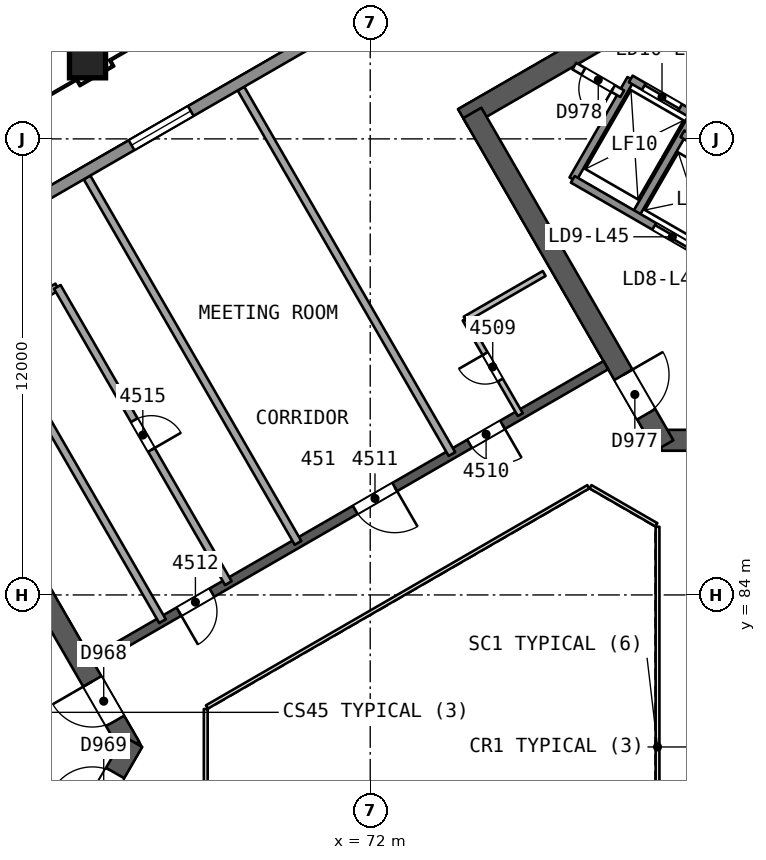
"""IFC4 building model, lengths in metres.
Left out: names, types, materials, properties, quantities, classifications, styles, units other than length and angle.
Written with IfcOpenShell. Run it as: python <this file> out.ifc"""

import sys

from ifc_helpers import new_model, si_unit, direction, frame, frame_2d, origin, origin_2d, place, context, subcontext, project, spatial, rectangle, extrude, element, fill, save


model = new_model("IFC4")
c1 = context("Model", 3, precision=1e-05, world=origin(), true_north=direction((0.0, 1.0)))
c2 = subcontext(c1, "Body", "Model", "MODEL_VIEW")
j1 = project(units=[si_unit("LENGTHUNIT", "METRE"), si_unit("PLANEANGLEUNIT", "RADIAN")], contexts=[c1])
p1 = place(None, origin())
s1 = spatial("IfcSite", under=j1, at=p1, CompositionType="ELEMENT")
p2 = place(p1, origin())
s2 = spatial("IfcBuilding", under=s1, at=p2, CompositionType="ELEMENT")
p3 = place(p2, frame((0.0, 0.0, 185.9)))
s3 = spatial("IfcBuildingStorey", under=s2, at=p3, CompositionType="ELEMENT", Elevation=185.9)
p4 = place(p3, frame((65.682, 80.0, 0.0), z_axis=(0.0, 0.0, 1.0), x_axis=(-0.500000202252, 0.866025287014, 0.0)))
e1 = element("IfcWall", 1, at=p4, inside=s3, PredefinedType="SHEAR", context=c2, shape_type="SweptSolid", body=[
    extrude(rectangle(XDim=10.221, YDim=0.55, at=frame_2d((5.111, 0.0))), origin(), (0.0, 0.0, 1.0), 3.7),
])
p5 = place(p4, frame((0.791, 0.0, 0.0)))
e2 = element("IfcOpeningElement", 2, at=p5, cuts=e1, PredefinedType="OPENING", context=c2, shape_type="SweptSolid", body=[
    extrude(rectangle(XDim=1.2, YDim=2.1, at=frame_2d((0.6, 1.05))), frame((0.0, 0.286, 0.0), z_axis=(0.0, -1.0, 0.0), x_axis=(1.0, 0.0, 0.0)), (0.0, 0.0, 1.0), 0.571),
])
p6 = place(p3, frame((60.709, 71.386, 0.0), z_axis=(0.0, 0.0, 1.0), x_axis=(0.500015938302, 0.866016201606, 0.0)))
e3 = element("IfcWall", 3, at=p6, inside=s3, PredefinedType="SHEAR", context=c2, shape_type="SweptSolid", body=[
    extrude(rectangle(XDim=10.105, YDim=0.55, at=frame_2d((5.053, 0.0))), origin(), (0.0, 0.0, 1.0), 3.7),
])
p7 = place(p6, frame((7.955, 0.0, 0.0)))
e4 = element("IfcOpeningElement", 4, at=p7, cuts=e3, PredefinedType="OPENING", context=c2, shape_type="SweptSolid", body=[
    extrude(rectangle(XDim=1.2, YDim=2.1, at=frame_2d((0.6, 1.05))), frame((0.0, 0.286, 0.0), z_axis=(0.0, -1.0, 0.0), x_axis=(1.0, 0.0, 0.0)), (0.0, 0.0, 1.0), 0.571),
])
p8 = place(p3, frame((79.659, 88.069, 0.0), z_axis=(0.0, 0.0, 1.0), x_axis=(1.0, 0.0, 0.0)))
e5 = element("IfcWall", 5, at=p8, inside=s3, PredefinedType="SHEAR", context=c2, shape_type="SweptSolid", body=[
    extrude(rectangle(XDim=10.221, YDim=0.55, at=frame_2d((5.111, 0.0))), origin(), (0.0, 0.0, 1.0), 3.7),
])
p9 = place(p8, frame((0.791, 0.0, 0.0)))
e6 = element("IfcOpeningElement", 6, at=p9, cuts=e5, PredefinedType="OPENING", context=c2, shape_type="SweptSolid", body=[
    extrude(rectangle(XDim=1.2, YDim=2.1, at=frame_2d((0.6, 1.05))), frame((0.0, 0.286, 0.0), z_axis=(0.0, -1.0, 0.0), x_axis=(1.0, 0.0, 0.0)), (0.0, 0.0, 1.0), 0.571),
])
p10 = place(p3, frame((86.723, 103.633, 0.0), z_axis=(0.0, 0.0, 1.0), x_axis=(-0.866023530946, -0.500003243837, 0.0)))
e7 = element("IfcWall", 7, at=p10, inside=s3, PredefinedType="SHEAR", context=c2, shape_type="SweptSolid", body=[
    extrude(rectangle(XDim=14.175, YDim=0.55, at=frame_2d((7.087, 0.0))), origin(), (0.0, 0.0, 1.0), 3.7),
])
p11 = place(p3, frame((74.686, 96.683, 0.0), z_axis=(0.0, 0.0, 1.0), x_axis=(0.499997818338, -0.866026663364, 0.0)))
e8 = element("IfcWall", 8, at=p11, inside=s3, PredefinedType="SHEAR", context=c2, shape_type="SweptSolid", body=[
    extrude(rectangle(XDim=10.105, YDim=0.55, at=frame_2d((5.052, 0.0))), origin(), (0.0, 0.0, 1.0), 3.7),
])
p12 = place(p11, frame((7.955, 0.0, 0.0)))
e9 = element("IfcOpeningElement", 9, at=p12, cuts=e8, PredefinedType="OPENING", context=c2, shape_type="SweptSolid", body=[
    extrude(rectangle(XDim=1.2, YDim=2.1, at=frame_2d((0.6, 1.05))), frame((0.0, 0.286, 0.0), z_axis=(0.0, -1.0, 0.0), x_axis=(1.0, 0.0, 0.0)), (0.0, 0.0, 1.0), 0.571),
])
p13 = place(p3, frame((78.2, 90.046, 0.0), z_axis=(0.0, 0.0, 1.0), x_axis=(-0.866026492143, -0.499998114903, 0.0)))
e10 = element("IfcWall", 10, at=p13, inside=s3, PredefinedType="SHEAR", context=c2, shape_type="SweptSolid", body=[
    extrude(rectangle(XDim=15.588, YDim=0.25, at=frame_2d((7.794, 0.0))), origin(), (0.0, 0.0, 1.0), 3.25),
])
p14 = place(p13, frame((3.138, 0.0, 0.0)))
e11 = element("IfcOpeningElement", 11, at=p14, cuts=e10, PredefinedType="OPENING", context=c2, shape_type="SweptSolid", body=[
    extrude(rectangle(XDim=1.0, YDim=2.1, at=frame_2d((0.5, 1.05))), frame((0.0, 0.135, 0.0), z_axis=(0.0, -1.0, 0.0), x_axis=(1.0, 0.0, 0.0)), (0.0, 0.0, 1.0), 0.271),
])
p15 = place(p13, frame((6.415, 0.0, 0.0)))
e12 = element("IfcOpeningElement", 12, at=p15, cuts=e10, PredefinedType="OPENING", context=c2, shape_type="SweptSolid", body=[
    extrude(rectangle(XDim=1.2, YDim=2.4, at=frame_2d((0.6, 1.2))), frame((0.0, 0.135, 0.0), z_axis=(0.0, -1.0, 0.0), x_axis=(1.0, 0.0, 0.0)), (0.0, 0.0, 1.0), 0.271),
])
p16 = place(p13, frame((11.971, 0.0, 0.0)))
e13 = element("IfcOpeningElement", 13, at=p16, cuts=e10, PredefinedType="OPENING", context=c2, shape_type="SweptSolid", body=[
    extrude(rectangle(XDim=1.0, YDim=2.1, at=frame_2d((0.5, 1.05))), frame((0.0, 0.135, 0.0), z_axis=(0.0, -1.0, 0.0), x_axis=(1.0, 0.0, 0.0)), (0.0, 0.0, 1.0), 0.271),
])
p17 = place(p3, frame((64.549, 98.102, 0.0), z_axis=(0.010092954999, -0.017481261926, 0.999796248113), x_axis=(-0.499897099477, 0.865849541015, 0.020185694417)))
e14 = element("IfcColumn", 14, at=p17, inside=s3, PredefinedType="COLUMN", context=c2, shape_type="SweptSolid", body=[
    extrude(rectangle(XDim=0.95, YDim=0.95, at=origin_2d()), origin(), (0.0, 0.0, 1.0), 3.701),
])
p18 = place(p3, frame((75.948, 88.746, 0.0), z_axis=(0.0, 0.0, 1.0), x_axis=(-0.499987231761, 0.866032775405, 0.0)))
e15 = element("IfcWall", 15, at=p18, inside=s3, PredefinedType="PARTITIONING", context=c2, shape_type="SweptSolid", body=[
    extrude(rectangle(XDim=2.9, YDim=0.15, at=frame_2d((1.45, 0.0))), origin(), (0.0, 0.0, 1.0), 3.25),
])
p19 = place(p18, frame((1.05, 0.0, 0.0)))
e16 = element("IfcOpeningElement", 16, at=p19, cuts=e15, PredefinedType="OPENING", context=c2, shape_type="SweptSolid", body=[
    extrude(rectangle(XDim=0.8, YDim=2.1, at=frame_2d((0.4, 1.05))), frame((0.0, 0.085, 0.0), z_axis=(0.0, -1.0, 0.0), x_axis=(1.0, 0.0, 0.0)), (0.0, 0.0, 1.0), 0.171),
])
p20 = place(p3, frame((74.498, 91.257, 0.0), z_axis=(0.0, 0.0, 1.0), x_axis=(0.866038271014, 0.499977712642, 0.0)))
e17 = element("IfcWall", 17, at=p20, inside=s3, PredefinedType="PARTITIONING", context=c2, shape_type="SweptSolid", body=[
    extrude(rectangle(XDim=2.401, YDim=0.15, at=frame_2d((1.2, 0.0))), origin(), (0.0, 0.0, 1.0), 3.25),
])
for number, where, z_axis, x_axis in (
    (18, (68.598, 97.323, 0.0), (0.0, 0.0, 1.0), (0.5, -0.866, 0.0)),
    (19, (64.548, 94.985, 0.0), (0.0, 0.0, 1.0), (0.5, -0.866, 0.0)),
):
    element("IfcWall", number, at=place(p3, frame(where, z_axis=z_axis, x_axis=x_axis)), inside=s3, PredefinedType="PARTITIONING", context=c2, shape_type="SweptSolid", body=[
        extrude(rectangle(XDim=11.104, YDim=0.2, at=frame_2d((5.552, 0.0))), origin(), (0.0, 0.0, 1.0), 3.25),
    ])
p21 = place(p3, frame((66.534, 83.311, 0.0), z_axis=(0.0, 0.0, 1.0), x_axis=(-0.5000018851, 0.866024315419, 0.0)))
e20 = element("IfcWall", 20, at=p21, inside=s3, PredefinedType="PARTITIONING", context=c2, shape_type="SweptSolid", body=[
    extrude(rectangle(XDim=9.0, YDim=0.2, at=frame_2d((4.5, 0.0))), origin(), (0.0, 0.0, 1.0), 3.25),
])
p22 = place(p3, frame((62.034, 91.105, 0.0), z_axis=(0.0, 0.0, 1.0), x_axis=(0.866041268327, 0.499972520799, 0.0)))
e21 = element("IfcWall", 21, at=p22, inside=s3, PredefinedType="PARTITIONING", context=c2, shape_type="SweptSolid", body=[
    extrude(rectangle(XDim=2.0, YDim=0.2, at=frame_2d((1.0, 0.0))), origin(), (0.0, 0.0, 1.0), 3.25),
])
p23 = place(p3, frame((63.766, 92.105, 0.0), z_axis=(0.0, 0.0, 1.0), x_axis=(0.5000018851, -0.866024315419, 0.0)))
e22 = element("IfcWall", 22, at=p23, inside=s3, PredefinedType="PARTITIONING", context=c2, shape_type="SweptSolid", body=[
    extrude(rectangle(XDim=9.0, YDim=0.2, at=frame_2d((4.5, 0.0))), origin(), (0.0, 0.0, 1.0), 3.25),
])
p24 = place(p23, frame((4.05, 0.0, 0.0)))
e23 = element("IfcOpeningElement", 23, at=p24, cuts=e22, PredefinedType="OPENING", context=c2, shape_type="SweptSolid", body=[
    extrude(rectangle(XDim=0.9, YDim=2.1, at=frame_2d((0.45, 1.05))), frame((0.0, 0.11, 0.0), z_axis=(0.0, -1.0, 0.0), x_axis=(1.0, 0.0, 0.0)), (0.0, 0.0, 1.0), 0.221),
])
p25 = place(p3, frame((42.971, 82.7, 0.0), z_axis=(0.0, 0.0, 1.0), x_axis=(0.866024890781, 0.500000888547, 0.0)))
e24 = element("IfcWall", 24, at=p25, inside=s3, PredefinedType="SOLIDWALL", context=c2, shape_type="SweptSolid", body=[
    extrude(rectangle(XDim=52.776, YDim=0.3, at=frame_2d((26.388, 0.0))), origin(), (0.0, 0.0, 1.0), 3.25),
])
p26 = place(p25, frame((20.511, 0.0, 0.0)))
e25 = element("IfcOpeningElement", 25, at=p26, cuts=e24, PredefinedType="OPENING", context=c2, shape_type="SweptSolid", body=[
    extrude(rectangle(XDim=2.4, YDim=2.4, at=frame_2d((1.2, 1.2))), frame((0.0, 0.161, 0.0), z_axis=(0.0, -1.0, 0.0), x_axis=(1.0, 0.0, 0.0)), (0.0, 0.0, 1.0), 0.321),
])
p27 = place(p25, frame((9.385, 0.0, 0.0)))
e26 = element("IfcOpeningElement", 26, at=p27, cuts=e24, PredefinedType="OPENING", context=c2, shape_type="SweptSolid", body=[
    extrude(rectangle(XDim=2.4, YDim=2.4, at=frame_2d((1.2, 1.2))), frame((0.0, 0.161, 0.0), z_axis=(0.0, -1.0, 0.0), x_axis=(1.0, 0.0, 0.0)), (0.0, 0.0, 1.0), 0.321),
])
p28 = place(p25, frame((39.984, 0.0, 0.0)))
e27 = element("IfcOpeningElement", 27, at=p28, cuts=e24, PredefinedType="OPENING", context=c2, shape_type="SweptSolid", body=[
    extrude(rectangle(XDim=2.4, YDim=2.4, at=frame_2d((1.2, 1.2))), frame((0.0, 0.161, 0.0), z_axis=(0.0, -1.0, 0.0), x_axis=(1.0, 0.0, 0.0)), (0.0, 0.0, 1.0), 0.321),
])
p29 = place(p25, frame((26.268, 0.0, 0.9)))
e28 = element("IfcOpeningElement", 28, at=p29, cuts=e24, PredefinedType="OPENING", context=c2, shape_type="SweptSolid", body=[
    extrude(rectangle(XDim=1.8, YDim=1.5, at=frame_2d((0.9, 0.75))), frame((0.0, 0.161, 0.0), z_axis=(0.0, -1.0, 0.0), x_axis=(1.0, 0.0, 0.0)), (0.0, 0.0, 1.0), 0.321),
])
for number, where, z_axis, x_axis in (
    (29, (78.976, 93.986, 0.0), (0.0, 0.0, 1.0), (0.5, 0.866, 0.0)),
    (30, (77.33, 94.936, 0.0), (0.0, 0.0, 1.0), (0.5, 0.866, 0.0)),
):
    element("IfcWall", number, at=place(p3, frame(where, z_axis=z_axis, x_axis=x_axis)), inside=s3, PredefinedType="SOLIDWALL", context=c2, shape_type="SweptSolid", body=[
        extrude(rectangle(XDim=3.05, YDim=0.2, at=frame_2d((1.525, 0.0))), origin(), (0.0, 0.0, 1.0), 3.25),
    ])
p30 = place(p3, frame((86.77, 89.486, 0.0), z_axis=(0.0, 0.0, 1.0), x_axis=(-0.86601811187, 0.500012629753, 0.0)))
e31 = element("IfcWall", 31, at=p30, inside=s3, PredefinedType="SOLIDWALL", context=c2, shape_type="SweptSolid", body=[
    extrude(rectangle(XDim=10.9, YDim=0.2, at=frame_2d((5.45, 0.0))), origin(), (0.0, 0.0, 1.0), 3.25),
])
p31 = place(p30, frame((0.575, 0.0, 0.0)))
e32 = element("IfcOpeningElement", 32, at=p31, cuts=e31, PredefinedType="OPENING", context=c2, shape_type="SweptSolid", body=[
    extrude(rectangle(XDim=1.1, YDim=2.1, at=frame_2d((0.55, 1.05))), frame((0.0, 0.11, 0.0), z_axis=(0.0, -1.0, 0.0), x_axis=(1.0, 0.0, 0.0)), (0.0, 0.0, 1.0), 0.221),
])
p32 = place(p30, frame((2.825, 0.0, 0.0)))
e33 = element("IfcOpeningElement", 33, at=p32, cuts=e31, PredefinedType="OPENING", context=c2, shape_type="SweptSolid", body=[
    extrude(rectangle(XDim=1.1, YDim=2.1, at=frame_2d((0.55, 1.05))), frame((0.0, 0.11, 0.0), z_axis=(0.0, -1.0, 0.0), x_axis=(1.0, 0.0, 0.0)), (0.0, 0.0, 1.0), 0.221),
])
p33 = place(p30, frame((5.075, 0.0, 0.0)))
e34 = element("IfcOpeningElement", 34, at=p33, cuts=e31, PredefinedType="OPENING", context=c2, shape_type="SweptSolid", body=[
    extrude(rectangle(XDim=1.1, YDim=2.1, at=frame_2d((0.55, 1.05))), frame((0.0, 0.11, 0.0), z_axis=(0.0, -1.0, 0.0), x_axis=(1.0, 0.0, 0.0)), (0.0, 0.0, 1.0), 0.221),
])
p34 = place(p30, frame((7.325, 0.0, 0.0)))
e35 = element("IfcOpeningElement", 35, at=p34, cuts=e31, PredefinedType="OPENING", context=c2, shape_type="SweptSolid", body=[
    extrude(rectangle(XDim=1.1, YDim=2.1, at=frame_2d((0.55, 1.05))), frame((0.0, 0.11, 0.0), z_axis=(0.0, -1.0, 0.0), x_axis=(1.0, 0.0, 0.0)), (0.0, 0.0, 1.0), 0.221),
])
p35 = place(p3, frame((89.33, 90.872, 0.0), z_axis=(0.0, 0.0, 1.0), x_axis=(-0.866027589512, 0.49999621419, 0.0)))
e36 = element("IfcWall", 36, at=p35, inside=s3, PredefinedType="SOLIDWALL", context=c2, shape_type="SweptSolid", body=[
    extrude(rectangle(XDim=10.524, YDim=0.2, at=frame_2d((5.262, 0.0))), origin(), (0.0, 0.0, 1.0), 3.25),
])
p36 = place(p35, frame((0.312, 0.0, 0.0)))
e37 = element("IfcOpeningElement", 37, at=p36, cuts=e36, PredefinedType="OPENING", context=c2, shape_type="SweptSolid", body=[
    extrude(rectangle(XDim=0.9, YDim=2.1, at=frame_2d((0.45, 1.05))), frame((0.0, 0.11, 0.0), z_axis=(0.0, -1.0, 0.0), x_axis=(1.0, 0.0, 0.0)), (0.0, 0.0, 1.0), 0.221),
])
p37 = place(p3, frame((78.63, 97.188, 0.0), z_axis=(0.0, 0.0, 1.0), x_axis=(-0.866003949776, 0.500037157592, 0.0)))
e38 = element("IfcWall", 38, at=p37, inside=s3, PredefinedType="PARTITIONING", context=c2, shape_type="SweptSolid", body=[
    extrude(rectangle(XDim=1.455, YDim=0.2, at=frame_2d((0.728, 0.0))), origin(), (0.0, 0.0, 1.0), 3.25),
])
p38 = place(p37, frame((0.278, 0.0, 0.0)))
e39 = element("IfcOpeningElement", 39, at=p38, cuts=e38, PredefinedType="OPENING", context=c2, shape_type="SweptSolid", body=[
    extrude(rectangle(XDim=0.9, YDim=2.1, at=frame_2d((0.45, 1.05))), frame((0.0, 0.11, 0.0), z_axis=(0.0, -1.0, 0.0), x_axis=(1.0, 0.0, 0.0)), (0.0, 0.0, 1.0), 0.221),
])
p39 = place(p3, frame((80.5, 96.627, 0.0), z_axis=(0.0, 0.0, 1.0), x_axis=(-0.86601224135, 0.500022797313, 0.0)))
e40 = element("IfcWall", 40, at=p39, inside=s3, PredefinedType="SOLIDWALL", context=c2, shape_type="SweptSolid", body=[
    extrude(rectangle(XDim=1.9, YDim=0.2, at=frame_2d((0.95, 0.0))), origin(), (0.0, 0.0, 1.0), 3.25),
])
p40 = place(p39, frame((0.4, 0.0, 0.0)))
e41 = element("IfcOpeningElement", 41, at=p40, cuts=e40, PredefinedType="OPENING", context=c2, shape_type="SweptSolid", body=[
    extrude(rectangle(XDim=1.1, YDim=2.1, at=frame_2d((0.55, 1.05))), frame((0.0, 0.11, 0.0), z_axis=(0.0, -1.0, 0.0), x_axis=(1.0, 0.0, 0.0)), (0.0, 0.0, 1.0), 0.221),
])
p41 = place(p3, frame((79.56, 74.206, 0.0), z_axis=(0.0, 0.0, 1.0), x_axis=(0.0, 1.0, 0.0)))
e42 = element("IfcWall", 42, at=p41, inside=s3, PredefinedType="PARTITIONING", context=c2, shape_type="SweptSolid", body=[
    extrude(rectangle(XDim=11.588, YDim=0.1, at=frame_2d((5.794, 0.0))), origin(), (0.0, 0.0, 1.0), 3.25),
])
p42 = place(p3, frame((79.53, 85.846, 0.0), z_axis=(0.0, 0.0, 1.0), x_axis=(-0.866041268327, 0.499972520799, 0.0)))
e43 = element("IfcWall", 43, at=p42, inside=s3, PredefinedType="PARTITIONING", context=c2, shape_type="SweptSolid", body=[
    extrude(rectangle(XDim=2.0, YDim=0.1, at=frame_2d((1.0, 0.0))), origin(), (0.0, 0.0, 1.0), 3.25),
])
p43 = place(p3, frame((77.738, 86.846, 0.0), z_axis=(0.0, 0.0, 1.0), x_axis=(-0.866026658274, -0.499997827154, 0.0)))
e44 = element("IfcWall", 44, at=p43, inside=s3, PredefinedType="PARTITIONING", context=c2, shape_type="SweptSolid", body=[
    extrude(rectangle(XDim=11.588, YDim=0.1, at=frame_2d((5.794, 0.0))), origin(), (0.0, 0.0, 1.0), 3.25),
])
p44 = place(p3, frame((67.672, 81.0, 0.0), z_axis=(0.0, 0.0, 1.0), x_axis=(0.0, -1.0, 0.0)))
e45 = element("IfcWall", 45, at=p44, inside=s3, PredefinedType="PARTITIONING", context=c2, shape_type="SweptSolid", body=[
    extrude(rectangle(XDim=2.0, YDim=0.1, at=frame_2d((1.0, 0.0))), origin(), (0.0, 0.0, 1.0), 3.25),
])
p45 = place(p19, origin())
e46 = element("IfcDoor", 46, at=p45, inside=s3, OperationType="SINGLE_SWING_RIGHT", PredefinedType="NOTDEFINED", context=c2, shape_type="SweptSolid", body=[
    extrude(rectangle(XDim=0.8, YDim=2.1, at=frame_2d((0.4, 1.05))), frame((0.0, 0.025, 0.0), z_axis=(0.0, -1.0, 0.0), x_axis=(1.0, 0.0, 0.0)), (0.0, 0.0, 1.0), 0.05),
])
fill(e16, e46)
p46 = place(p14, origin())
e47 = element("IfcDoor", 47, at=p46, inside=s3, OperationType="SINGLE_SWING_LEFT", PredefinedType="NOTDEFINED", context=c2, shape_type="SweptSolid", body=[
    extrude(rectangle(XDim=1.0, YDim=2.1, at=frame_2d((0.5, 1.05))), frame((0.0, 0.025, 0.0), z_axis=(0.0, -1.0, 0.0), x_axis=(1.0, 0.0, 0.0)), (0.0, 0.0, 1.0), 0.05),
])
fill(e11, e47)
p47 = place(p15, origin())
e48 = element("IfcDoor", 48, at=p47, inside=s3, OperationType="SINGLE_SWING_LEFT", PredefinedType="NOTDEFINED", context=c2, shape_type="SweptSolid", body=[
    extrude(rectangle(XDim=1.2, YDim=2.4, at=frame_2d((0.6, 1.2))), frame((0.0, 0.025, 0.0), z_axis=(0.0, -1.0, 0.0), x_axis=(1.0, 0.0, 0.0)), (0.0, 0.0, 1.0), 0.05),
])
fill(e12, e48)
p48 = place(p16, origin())
e49 = element("IfcDoor", 49, at=p48, inside=s3, OperationType="SINGLE_SWING_RIGHT", PredefinedType="NOTDEFINED", context=c2, shape_type="SweptSolid", body=[
    extrude(rectangle(XDim=1.0, YDim=2.1, at=frame_2d((0.5, 1.05))), frame((0.0, 0.025, 0.0), z_axis=(0.0, -1.0, 0.0), x_axis=(1.0, 0.0, 0.0)), (0.0, 0.0, 1.0), 0.05),
])
fill(e13, e49)
p49 = place(p24, origin())
e50 = element("IfcDoor", 50, at=p49, inside=s3, OperationType="SINGLE_SWING_RIGHT", PredefinedType="NOTDEFINED", context=c2, shape_type="SweptSolid", body=[
    extrude(rectangle(XDim=0.9, YDim=2.1, at=frame_2d((0.45, 1.05))), frame((0.0, 0.025, 0.0), z_axis=(0.0, -1.0, 0.0), x_axis=(1.0, 0.0, 0.0)), (0.0, 0.0, 1.0), 0.05),
])
fill(e23, e50)
p50 = place(p29, origin())
e51 = element("IfcWindow", 51, at=p50, inside=s3, PartitioningType="SINGLE_PANEL", PredefinedType="WINDOW", context=c2, shape_type="SweptSolid", body=[
    extrude(rectangle(XDim=1.8, YDim=1.5, at=frame_2d((0.9, 0.75))), frame((0.0, 0.03, 0.0), z_axis=(0.0, -1.0, 0.0), x_axis=(1.0, 0.0, 0.0)), (0.0, 0.0, 1.0), 0.06),
])
fill(e28, e51)
p51 = place(p5, origin())
e52 = element("IfcDoor", 52, at=p51, inside=s3, OperationType="SINGLE_SWING_RIGHT", PredefinedType="NOTDEFINED", context=c2, shape_type="SweptSolid", body=[
    extrude(rectangle(XDim=1.2, YDim=2.1, at=frame_2d((0.6, 1.05))), frame((0.0, 0.025, 0.0), z_axis=(0.0, -1.0, 0.0), x_axis=(1.0, 0.0, 0.0)), (0.0, 0.0, 1.0), 0.05),
])
fill(e2, e52)
p52 = place(p7, origin())
e53 = element("IfcDoor", 53, at=p52, inside=s3, OperationType="SINGLE_SWING_LEFT", PredefinedType="NOTDEFINED", context=c2, shape_type="SweptSolid", body=[
    extrude(rectangle(XDim=1.2, YDim=2.1, at=frame_2d((0.6, 1.05))), frame((0.0, 0.025, 0.0), z_axis=(0.0, -1.0, 0.0), x_axis=(1.0, 0.0, 0.0)), (0.0, 0.0, 1.0), 0.05),
])
fill(e4, e53)
p53 = place(p12, origin())
e54 = element("IfcDoor", 54, at=p53, inside=s3, OperationType="SINGLE_SWING_LEFT", PredefinedType="NOTDEFINED", context=c2, shape_type="SweptSolid", body=[
    extrude(rectangle(XDim=1.2, YDim=2.1, at=frame_2d((0.6, 1.05))), frame((0.0, 0.025, 0.0), z_axis=(0.0, -1.0, 0.0), x_axis=(1.0, 0.0, 0.0)), (0.0, 0.0, 1.0), 0.05),
])
fill(e9, e54)
p54 = place(p34, origin())
e55 = element("IfcDoor", 55, at=p54, inside=s3, OperationType="SLIDING_TO_LEFT", PredefinedType="NOTDEFINED", context=c2, shape_type="SweptSolid", body=[
    extrude(rectangle(XDim=1.1, YDim=2.1, at=frame_2d((0.55, 1.05))), frame((0.0, 0.025, 0.0), z_axis=(0.0, -1.0, 0.0), x_axis=(1.0, 0.0, 0.0)), (0.0, 0.0, 1.0), 0.05),
])
fill(e35, e55)
p55 = place(p40, origin())
e56 = element("IfcDoor", 56, at=p55, inside=s3, OperationType="SLIDING_TO_RIGHT", PredefinedType="NOTDEFINED", context=c2, shape_type="SweptSolid", body=[
    extrude(rectangle(XDim=1.1, YDim=2.1, at=frame_2d((0.55, 1.05))), frame((0.0, 0.025, 0.0), z_axis=(0.0, -1.0, 0.0), x_axis=(1.0, 0.0, 0.0)), (0.0, 0.0, 1.0), 0.05),
])
fill(e41, e56)
p56 = place(p38, origin())
e57 = element("IfcDoor", 57, at=p56, inside=s3, OperationType="SINGLE_SWING_LEFT", PredefinedType="NOTDEFINED", context=c2, shape_type="SweptSolid", body=[
    extrude(rectangle(XDim=0.9, YDim=2.1, at=frame_2d((0.45, 1.05))), frame((0.0, 0.025, 0.0), z_axis=(0.0, -1.0, 0.0), x_axis=(1.0, 0.0, 0.0)), (0.0, 0.0, 1.0), 0.05),
])
fill(e39, e57)
save(model, sys.argv[1])
